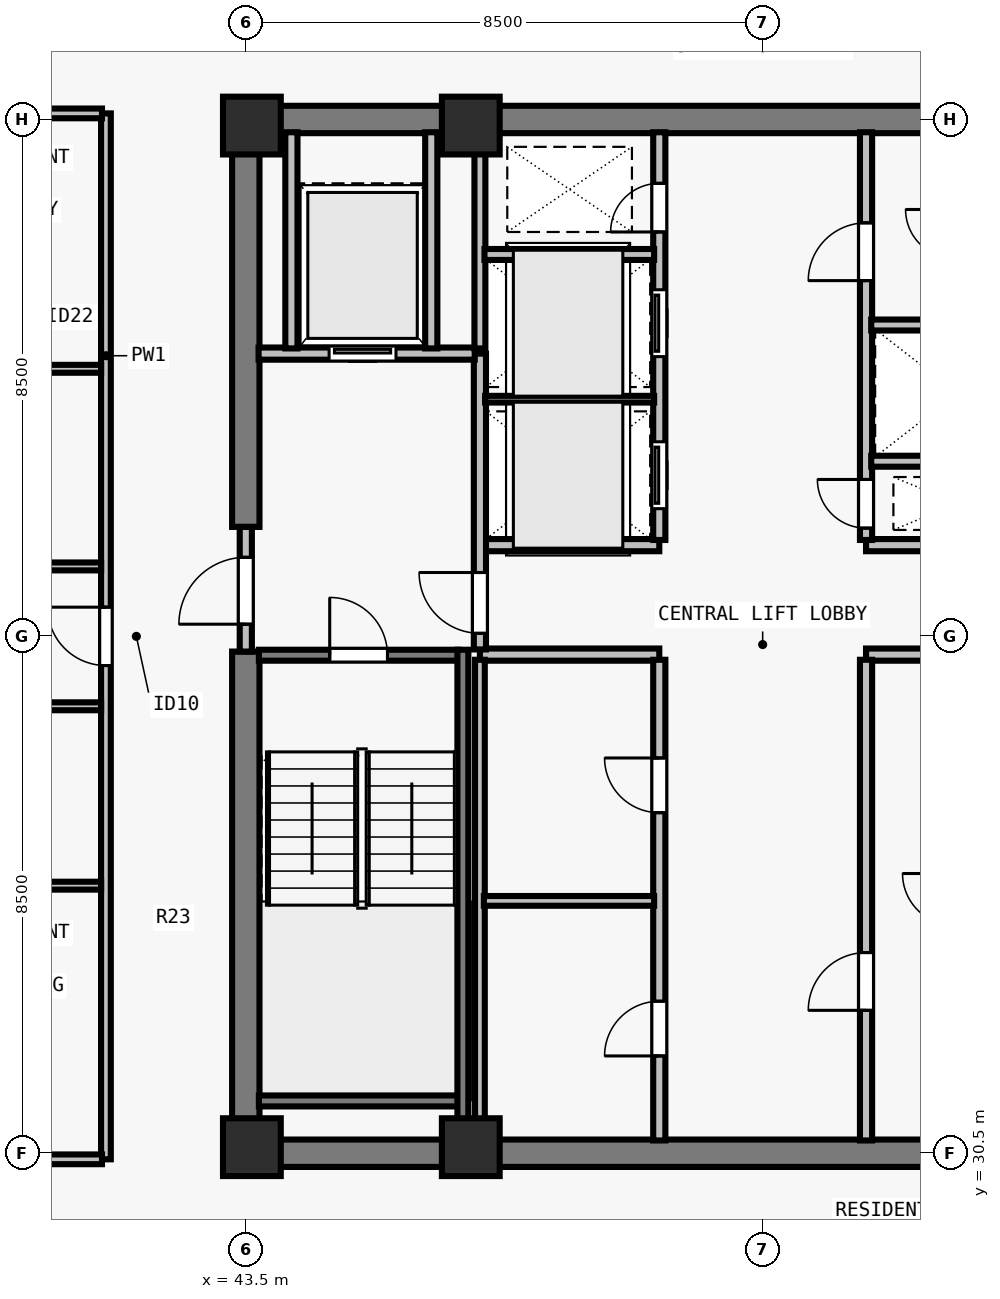
"""IFC4 building model, lengths in metres.
Left out: names, types, materials, properties, quantities, classifications, styles, units other than length and angle.
Written with IfcOpenShell. Run it as: python <this file> out.ifc"""

import sys

from ifc_helpers import new_model, si_unit, direction, frame, frame_2d, origin, origin_2d, place, context, subcontext, project, spatial, rectangle, extrude, element, fill, save


model = new_model("IFC4")
c1 = context("Model", 3, precision=1e-05, world=origin(), true_north=direction((0.0, 1.0)))
c2 = subcontext(c1, "Body", "Model", "MODEL_VIEW")
j1 = project(units=[si_unit("LENGTHUNIT", "METRE"), si_unit("PLANEANGLEUNIT", "RADIAN")], contexts=[c1])
p1 = place(None, origin())
s1 = spatial("IfcSite", under=j1, at=p1, CompositionType="ELEMENT")
p2 = place(p1, origin())
s2 = spatial("IfcBuilding", under=s1, at=p2, CompositionType="ELEMENT")
p3 = place(p2, frame((0.0, 0.0, 258.5)))
s3 = spatial("IfcBuildingStorey", under=s2, at=p3, CompositionType="ELEMENT", Elevation=258.5)
for number, where, z_axis, x_axis in (
    (1, (43.6, 30.6, 0.0), (0.0, 0.0, 1.0), (1.0, 0.0, 0.0)),
    (2, (47.2, 30.6, 0.0), (0.0, 0.0, 1.0), (1.0, 0.0, 0.0)),
    (3, (43.6, 47.4, 0.0), (0.0, 0.0, 1.0), (1.0, 0.0, 0.0)),
    (4, (47.2, 47.4, 0.0), (0.0, 0.0, 1.0), (1.0, 0.0, 0.0)),
):
    element("IfcColumn", number, at=place(p3, frame(where, z_axis=z_axis, x_axis=x_axis)), inside=s3, PredefinedType="COLUMN", context=c2, shape_type="SweptSolid", body=[
        extrude(rectangle(XDim=0.95, YDim=0.95, at=origin_2d()), origin(), (0.0, 0.0, 1.0), 3.5),
    ])
for number, where, z_axis, x_axis in (
    (5, (43.275, 30.5, 0.0), (0.0, 0.0, 1.0), (1.0, 0.0, 0.0)),
    (6, (43.275, 47.5, 0.0), (0.0, 0.0, 1.0), (1.0, 0.0, 0.0)),
):
    element("IfcWall", number, at=place(p3, frame(where, z_axis=z_axis, x_axis=x_axis)), inside=s3, PredefinedType="SHEAR", context=c2, shape_type="SweptSolid", body=[
        extrude(rectangle(XDim=17.45, YDim=0.45, at=frame_2d((8.725, 0.0))), origin(), (0.0, 0.0, 1.0), 3.29),
    ])
p4 = place(p3, frame((43.5, 30.715, 0.0), z_axis=(0.0, 0.0, 1.0), x_axis=(0.0, 1.0, 0.0)))
e7 = element("IfcWall", 7, at=p4, inside=s3, PredefinedType="SHEAR", context=c2, shape_type="SweptSolid", body=[
    extrude(rectangle(XDim=8.035, YDim=0.45, at=frame_2d((4.018, 0.0))), origin(), (0.0, 0.0, 1.0), 3.29),
])
p5 = place(p3, frame((43.5, 40.8, 0.0), z_axis=(0.0, 0.0, 1.0), x_axis=(0.0, 1.0, 0.0)))
e8 = element("IfcWall", 8, at=p5, inside=s3, PredefinedType="SHEAR", context=c2, shape_type="SweptSolid", body=[
    extrude(rectangle(XDim=6.485, YDim=0.45, at=frame_2d((3.242, 0.0))), origin(), (0.0, 0.0, 1.0), 3.29),
])
for number, where, z_axis, x_axis in (
    (9, (47.35, 38.7, 0.0), (0.0, 0.0, 1.0), (1.0, 0.0, 0.0)),
    (10, (47.35, 40.5, 0.0), (0.0, 0.0, 1.0), (1.0, 0.0, 0.0)),
    (11, (53.7, 38.7, 0.0), (0.0, 0.0, 1.0), (1.0, 0.0, 0.0)),
    (12, (53.7, 40.5, 0.0), (0.0, 0.0, 1.0), (1.0, 0.0, 0.0)),
):
    element("IfcWall", number, at=place(p3, frame(where, z_axis=z_axis, x_axis=x_axis)), inside=s3, PredefinedType="SOLIDWALL", context=c2, shape_type="SweptSolid", body=[
        extrude(rectangle(XDim=2.95, YDim=0.2, at=frame_2d((1.475, 0.0))), origin(), (0.0, 0.0, 1.0), 3.29),
    ])
p6 = place(p3, frame((50.3, 30.71, 0.0), z_axis=(0.0, 0.0, 1.0), x_axis=(0.0, 1.0, 0.0)))
e13 = element("IfcWall", 13, at=p6, inside=s3, PredefinedType="SOLIDWALL", context=c2, shape_type="SweptSolid", body=[
    extrude(rectangle(XDim=7.905, YDim=0.2, at=frame_2d((3.953, 0.0))), origin(), (0.0, 0.0, 1.0), 3.29),
])
p7 = place(p6, frame((1.39, 0.0, 0.0)))
e14 = element("IfcOpeningElement", 14, at=p7, cuts=e13, PredefinedType="OPENING", context=c2, shape_type="SweptSolid", body=[
    extrude(rectangle(XDim=0.9, YDim=2.12, at=frame_2d((0.45, 1.06))), frame((0.0, 0.11, 0.0), z_axis=(0.0, -1.0, 0.0), x_axis=(1.0, 0.0, 0.0)), (0.0, 0.0, 1.0), 0.22),
])
p8 = place(p6, frame((5.39, 0.0, 0.0)))
e15 = element("IfcOpeningElement", 15, at=p8, cuts=e13, PredefinedType="OPENING", context=c2, shape_type="SweptSolid", body=[
    extrude(rectangle(XDim=0.9, YDim=2.12, at=frame_2d((0.45, 1.06))), frame((0.0, 0.11, 0.0), z_axis=(0.0, -1.0, 0.0), x_axis=(1.0, 0.0, 0.0)), (0.0, 0.0, 1.0), 0.22),
])
p9 = place(p3, frame((53.7, 30.71, 0.0), z_axis=(0.0, 0.0, 1.0), x_axis=(0.0, 1.0, 0.0)))
e16 = element("IfcWall", 16, at=p9, inside=s3, PredefinedType="SOLIDWALL", context=c2, shape_type="SweptSolid", body=[
    extrude(rectangle(XDim=7.905, YDim=0.2, at=frame_2d((3.953, 0.0))), origin(), (0.0, 0.0, 1.0), 3.29),
])
p10 = place(p9, frame((2.14, 0.0, 0.0)))
e17 = element("IfcOpeningElement", 17, at=p10, cuts=e16, PredefinedType="OPENING", context=c2, shape_type="SweptSolid", body=[
    extrude(rectangle(XDim=0.95, YDim=2.12, at=frame_2d((0.475, 1.06))), frame((0.0, 0.11, 0.0), z_axis=(0.0, -1.0, 0.0), x_axis=(1.0, 0.0, 0.0)), (0.0, 0.0, 1.0), 0.22),
])
p11 = place(p3, frame((50.3, 40.585, 0.0), z_axis=(0.0, 0.0, 1.0), x_axis=(0.0, 1.0, 0.0)))
e18 = element("IfcWall", 18, at=p11, inside=s3, PredefinedType="SOLIDWALL", context=c2, shape_type="SweptSolid", body=[
    extrude(rectangle(XDim=6.705, YDim=0.2, at=frame_2d((3.353, 0.0))), origin(), (0.0, 0.0, 1.0), 3.29),
])
p12 = place(p11, frame((0.515, 0.0, 0.0)))
e19 = element("IfcOpeningElement", 19, at=p12, cuts=e18, PredefinedType="OPENING", context=c2, shape_type="SweptSolid", body=[
    extrude(rectangle(XDim=1.1, YDim=2.2, at=frame_2d((0.55, 1.1))), frame((0.0, 0.11, 0.0), z_axis=(0.0, -1.0, 0.0), x_axis=(1.0, 0.0, 0.0)), (0.0, 0.0, 1.0), 0.22),
])
p13 = place(p11, frame((3.015, 0.0, 0.0)))
e20 = element("IfcOpeningElement", 20, at=p13, cuts=e18, PredefinedType="OPENING", context=c2, shape_type="SweptSolid", body=[
    extrude(rectangle(XDim=1.1, YDim=2.2, at=frame_2d((0.55, 1.1))), frame((0.0, 0.11, 0.0), z_axis=(0.0, -1.0, 0.0), x_axis=(1.0, 0.0, 0.0)), (0.0, 0.0, 1.0), 0.22),
])
p14 = place(p11, frame((5.065, 0.0, 0.0)))
e21 = element("IfcOpeningElement", 21, at=p14, cuts=e18, PredefinedType="OPENING", context=c2, shape_type="SweptSolid", body=[
    extrude(rectangle(XDim=0.8, YDim=2.08, at=frame_2d((0.4, 1.04))), frame((0.0, 0.11, 0.0), z_axis=(0.0, -1.0, 0.0), x_axis=(1.0, 0.0, 0.0)), (0.0, 0.0, 1.0), 0.22),
])
p15 = place(p3, frame((53.7, 40.585, 0.0), z_axis=(0.0, 0.0, 1.0), x_axis=(0.0, 1.0, 0.0)))
e22 = element("IfcWall", 22, at=p15, inside=s3, PredefinedType="SOLIDWALL", context=c2, shape_type="SweptSolid", body=[
    extrude(rectangle(XDim=6.705, YDim=0.2, at=frame_2d((3.353, 0.0))), origin(), (0.0, 0.0, 1.0), 3.29),
])
p16 = place(p15, frame((0.195, 0.0, 0.0)))
e23 = element("IfcOpeningElement", 23, at=p16, cuts=e22, PredefinedType="OPENING", context=c2, shape_type="SweptSolid", body=[
    extrude(rectangle(XDim=0.8, YDim=2.08, at=frame_2d((0.4, 1.04))), frame((0.0, 0.11, 0.0), z_axis=(0.0, -1.0, 0.0), x_axis=(1.0, 0.0, 0.0)), (0.0, 0.0, 1.0), 0.22),
])
p17 = place(p15, frame((4.265, 0.0, 0.0)))
e24 = element("IfcOpeningElement", 24, at=p17, cuts=e22, PredefinedType="OPENING", context=c2, shape_type="SweptSolid", body=[
    extrude(rectangle(XDim=0.95, YDim=2.12, at=frame_2d((0.475, 1.06))), frame((0.0, 0.11, 0.0), z_axis=(0.0, -1.0, 0.0), x_axis=(1.0, 0.0, 0.0)), (0.0, 0.0, 1.0), 0.22),
])
p18 = place(p3, frame((43.5, 38.75, 0.0), z_axis=(0.0, 0.0, 1.0), x_axis=(0.0, 1.0, 0.0)))
e25 = element("IfcWall", 25, at=p18, inside=s3, PredefinedType="SOLIDWALL", context=c2, shape_type="SweptSolid", body=[
    extrude(rectangle(XDim=2.05, YDim=0.2, at=frame_2d((1.025, 0.0))), origin(), (0.0, 0.0, 1.0), 3.29),
])
p19 = place(p18, frame((0.45, 0.0, 0.0)))
e26 = element("IfcOpeningElement", 26, at=p19, cuts=e25, PredefinedType="OPENING", context=c2, shape_type="SweptSolid", body=[
    extrude(rectangle(XDim=1.1, YDim=2.15, at=frame_2d((0.55, 1.075))), frame((0.0, 0.11, 0.0), z_axis=(0.0, -1.0, 0.0), x_axis=(1.0, 0.0, 0.0)), (0.0, 0.0, 1.0), 0.22),
])
p20 = place(p3, frame((47.35, 38.785, 0.0), z_axis=(0.0, 0.0, 1.0), x_axis=(0.0, 1.0, 0.0)))
e27 = element("IfcWall", 27, at=p20, inside=s3, PredefinedType="SOLIDWALL", context=c2, shape_type="SweptSolid", body=[
    extrude(rectangle(XDim=4.865, YDim=0.2, at=frame_2d((2.433, 0.0))), origin(), (0.0, 0.0, 1.0), 3.29),
])
p21 = place(p20, frame((0.265, 0.0, 0.0)))
e28 = element("IfcOpeningElement", 28, at=p21, cuts=e27, PredefinedType="OPENING", context=c2, shape_type="SweptSolid", body=[
    extrude(rectangle(XDim=1.0, YDim=2.15, at=frame_2d((0.5, 1.075))), frame((0.0, 0.11, 0.0), z_axis=(0.0, -1.0, 0.0), x_axis=(1.0, 0.0, 0.0)), (0.0, 0.0, 1.0), 0.22),
])
p22 = place(p3, frame((43.71, 43.65, 0.0), z_axis=(0.0, 0.0, 1.0), x_axis=(1.0, 0.0, 0.0)))
e29 = element("IfcWall", 29, at=p22, inside=s3, PredefinedType="SOLIDWALL", context=c2, shape_type="SweptSolid", body=[
    extrude(rectangle(XDim=3.555, YDim=0.2, at=frame_2d((1.777, 0.0))), origin(), (0.0, 0.0, 1.0), 3.29),
])
p23 = place(p22, frame((1.16, 0.0, 0.0)))
e30 = element("IfcOpeningElement", 30, at=p23, cuts=e29, PredefinedType="OPENING", context=c2, shape_type="SweptSolid", body=[
    extrude(rectangle(XDim=1.1, YDim=2.2, at=frame_2d((0.55, 1.1))), frame((0.0, 0.11, 0.0), z_axis=(0.0, -1.0, 0.0), x_axis=(1.0, 0.0, 0.0)), (0.0, 0.0, 1.0), 0.22),
])
for number, where, z_axis, x_axis in (
    (31, (46.55, 43.735, 0.0), (0.0, 0.0, 1.0), (0.0, 1.0, 0.0)),
    (32, (44.25, 43.735, 0.0), (0.0, 0.0, 1.0), (0.0, 1.0, 0.0)),
):
    element("IfcWall", number, at=place(p3, frame(where, z_axis=z_axis, x_axis=x_axis)), inside=s3, PredefinedType="SOLIDWALL", context=c2, shape_type="SweptSolid", body=[
        extrude(rectangle(XDim=3.555, YDim=0.2, at=frame_2d((1.777, 0.0))), origin(), (0.0, 0.0, 1.0), 3.29),
    ])
p24 = place(p3, frame((47.35, 30.71, 0.0), z_axis=(0.0, 0.0, 1.0), x_axis=(0.0, 1.0, 0.0)))
e33 = element("IfcWall", 33, at=p24, inside=s3, PredefinedType="PARTITIONING", context=c2, shape_type="SweptSolid", body=[
    extrude(rectangle(XDim=7.905, YDim=0.16, at=frame_2d((3.953, 0.0))), origin(), (0.0, 0.0, 1.0), 3.29),
])
p25 = place(p3, frame((47.415, 34.65, 0.0), z_axis=(0.0, 0.0, 1.0), x_axis=(1.0, 0.0, 0.0)))
e34 = element("IfcWall", 34, at=p25, inside=s3, PredefinedType="PARTITIONING", context=c2, shape_type="SweptSolid", body=[
    extrude(rectangle(XDim=2.8, YDim=0.16, at=frame_2d((1.4, 0.0))), origin(), (0.0, 0.0, 1.0), 3.29),
])
p26 = place(p3, frame((47.35, 43.735, 0.0), z_axis=(0.0, 0.0, 1.0), x_axis=(0.0, 1.0, 0.0)))
e35 = element("IfcWall", 35, at=p26, inside=s3, PredefinedType="SOLIDWALL", context=c2, shape_type="SweptSolid", body=[
    extrude(rectangle(XDim=3.555, YDim=0.18, at=frame_2d((1.777, 0.0))), origin(), (0.0, 0.0, 1.0), 3.29),
])
p27 = place(p3, frame((47.435, 42.9, 0.0), z_axis=(0.0, 0.0, 1.0), x_axis=(1.0, 0.0, 0.0)))
e36 = element("IfcWall", 36, at=p27, inside=s3, PredefinedType="PARTITIONING", context=c2, shape_type="SweptSolid", body=[
    extrude(rectangle(XDim=2.78, YDim=0.11, at=frame_2d((1.39, 0.0))), origin(), (0.0, 0.0, 1.0), 3.29),
])
p28 = place(p3, frame((47.425, 45.28, 0.0), z_axis=(0.0, 0.0, 1.0), x_axis=(1.0, 0.0, 0.0)))
e37 = element("IfcWall", 37, at=p28, inside=s3, PredefinedType="SOLIDWALL", context=c2, shape_type="SweptSolid", body=[
    extrude(rectangle(XDim=2.79, YDim=0.18, at=frame_2d((1.395, 0.0))), origin(), (0.0, 0.0, 1.0), 3.29),
])
p29 = place(p3, frame((53.785, 41.88, 0.0), z_axis=(0.0, 0.0, 1.0), x_axis=(1.0, 0.0, 0.0)))
e38 = element("IfcWall", 38, at=p29, inside=s3, PredefinedType="SOLIDWALL", context=c2, shape_type="SweptSolid", body=[
    extrude(rectangle(XDim=2.78, YDim=0.18, at=frame_2d((1.39, 0.0))), origin(), (0.0, 0.0, 1.0), 3.29),
])
p30 = place(p3, frame((53.785, 44.12, 0.0), z_axis=(0.0, 0.0, 1.0), x_axis=(1.0, 0.0, 0.0)))
e39 = element("IfcWall", 39, at=p30, inside=s3, PredefinedType="SOLIDWALL", context=c2, shape_type="SweptSolid", body=[
    extrude(rectangle(XDim=2.79, YDim=0.18, at=frame_2d((1.395, 0.0))), origin(), (0.0, 0.0, 1.0), 3.29),
])
p31 = place(p3, frame((41.2, 30.4, 0.0), z_axis=(0.0, 0.0, 1.0), x_axis=(0.0, 1.0, 0.0)))
e40 = element("IfcWall", 40, at=p31, inside=s3, PredefinedType="PARTITIONING", context=c2, shape_type="SweptSolid", body=[
    extrude(rectangle(XDim=17.2, YDim=0.16, at=frame_2d((8.6, 0.0))), origin(), (0.0, 0.0, 1.0), 3.29),
])
p32 = place(p31, frame((8.12, 0.0, 0.0)))
e41 = element("IfcOpeningElement", 41, at=p32, cuts=e40, PredefinedType="OPENING", context=c2, shape_type="SweptSolid", body=[
    extrude(rectangle(XDim=0.96, YDim=2.18, at=frame_2d((0.48, 1.09))), frame((0.0, 0.09, 0.0), z_axis=(0.0, -1.0, 0.0), x_axis=(1.0, 0.0, 0.0)), (0.0, 0.0, 1.0), 0.18),
])
for number, where, z_axis, x_axis in (
    (42, (29.805, 30.4, 0.0), (0.0, 0.0, 1.0), (1.0, 0.0, 0.0)),
    (43, (29.805, 47.6, 0.0), (0.0, 0.0, 1.0), (1.0, 0.0, 0.0)),
):
    element("IfcWall", number, at=place(p3, frame(where, z_axis=z_axis, x_axis=x_axis)), inside=s3, PredefinedType="PARTITIONING", context=c2, shape_type="SweptSolid", body=[
        extrude(rectangle(XDim=11.33, YDim=0.16, at=frame_2d((5.665, 0.0))), origin(), (0.0, 0.0, 1.0), 3.29),
    ])
p33 = place(p3, frame((38.37, 34.9, 0.0), z_axis=(0.0, 0.0, 1.0), x_axis=(1.0, 0.0, 0.0)))
e44 = element("IfcWall", 44, at=p33, inside=s3, PredefinedType="PLUMBINGWALL", context=c2, shape_type="SweptSolid", body=[
    extrude(rectangle(XDim=2.75, YDim=0.13, at=frame_2d((1.375, 0.0))), origin(), (0.0, 0.0, 1.0), 3.29),
])
p34 = place(p3, frame((38.37, 37.85, 0.0), z_axis=(0.0, 0.0, 1.0), x_axis=(1.0, 0.0, 0.0)))
e45 = element("IfcWall", 45, at=p34, inside=s3, PredefinedType="PLUMBINGWALL", context=c2, shape_type="SweptSolid", body=[
    extrude(rectangle(XDim=2.75, YDim=0.13, at=frame_2d((1.375, 0.0))), origin(), (0.0, 0.0, 1.0), 3.29),
])
p35 = place(p34, frame((0.55, 0.0, 0.0)))
e46 = element("IfcOpeningElement", 46, at=p35, cuts=e45, PredefinedType="OPENING", context=c2, shape_type="SweptSolid", body=[
    extrude(rectangle(XDim=0.85, YDim=2.08, at=frame_2d((0.425, 1.04))), frame((0.0, 0.075, 0.0), z_axis=(0.0, -1.0, 0.0), x_axis=(1.0, 0.0, 0.0)), (0.0, 0.0, 1.0), 0.15),
])
p36 = place(p3, frame((38.37, 43.4, 0.0), z_axis=(0.0, 0.0, 1.0), x_axis=(1.0, 0.0, 0.0)))
e47 = element("IfcWall", 47, at=p36, inside=s3, PredefinedType="PLUMBINGWALL", context=c2, shape_type="SweptSolid", body=[
    extrude(rectangle(XDim=2.75, YDim=0.13, at=frame_2d((1.375, 0.0))), origin(), (0.0, 0.0, 1.0), 2.958),
])
p37 = place(p3, frame((38.37, 40.15, 0.0), z_axis=(0.0, 0.0, 1.0), x_axis=(1.0, 0.0, 0.0)))
e48 = element("IfcWall", 48, at=p37, inside=s3, PredefinedType="PLUMBINGWALL", context=c2, shape_type="SweptSolid", body=[
    extrude(rectangle(XDim=2.75, YDim=0.13, at=frame_2d((1.375, 0.0))), origin(), (0.0, 0.0, 1.0), 3.29),
])
p38 = place(p37, frame((0.55, 0.0, 0.0)))
e49 = element("IfcOpeningElement", 49, at=p38, cuts=e48, PredefinedType="OPENING", context=c2, shape_type="SweptSolid", body=[
    extrude(rectangle(XDim=0.88, YDim=2.1, at=frame_2d((0.44, 1.05))), frame((0.0, 0.075, 0.0), z_axis=(0.0, -1.0, 0.0), x_axis=(1.0, 0.0, 0.0)), (0.0, 0.0, 1.0), 0.15),
])
p39 = place(p3, frame((43.715, 38.69, 0.0), z_axis=(0.0, 0.0, 1.0), x_axis=(1.0, 0.0, 0.0)))
e50 = element("IfcWall", 50, at=p39, inside=s3, PredefinedType="SOLIDWALL", context=c2, shape_type="SweptSolid", body=[
    extrude(rectangle(XDim=3.28, YDim=0.18, at=frame_2d((1.64, 0.0))), origin(), (0.0, 0.0, 1.0), 3.29),
])
p40 = place(p39, frame((1.165, 0.0, 0.0)))
e51 = element("IfcOpeningElement", 51, at=p40, cuts=e50, PredefinedType="OPENING", context=c2, shape_type="SweptSolid", body=[
    extrude(rectangle(XDim=0.95, YDim=2.15, at=frame_2d((0.475, 1.075))), frame((0.0, 0.1, 0.0), z_axis=(0.0, -1.0, 0.0), x_axis=(1.0, 0.0, 0.0)), (0.0, 0.0, 1.0), 0.2),
])
p41 = place(p3, frame((43.715, 31.36, 0.0), z_axis=(0.0, 0.0, 1.0), x_axis=(1.0, 0.0, 0.0)))
e52 = element("IfcWall", 52, at=p41, inside=s3, PredefinedType="SOLIDWALL", context=c2, shape_type="SweptSolid", body=[
    extrude(rectangle(XDim=3.28, YDim=0.18, at=frame_2d((1.64, 0.0))), origin(), (0.0, 0.0, 1.0), 3.29),
])
p42 = place(p3, frame((47.07, 38.78, 0.0), z_axis=(0.0, 0.0, 1.0), x_axis=(0.0, -1.0, 0.0)))
e53 = element("IfcWall", 53, at=p42, inside=s3, PredefinedType="SOLIDWALL", context=c2, shape_type="SweptSolid", body=[
    extrude(rectangle(XDim=8.067, YDim=0.18, at=frame_2d((4.034, 0.0))), origin(), (0.0, 0.0, 1.0), 3.29),
])
p43 = place(p19, origin())
e54 = element("IfcDoor", 54, at=p43, inside=s3, OperationType="SINGLE_SWING_LEFT", PredefinedType="DOOR", context=c2, shape_type="SweptSolid", body=[
    extrude(rectangle(XDim=1.1, YDim=2.15, at=frame_2d((0.55, 1.075))), frame((0.0, 0.025, 0.0), z_axis=(0.0, -1.0, 0.0), x_axis=(1.0, 0.0, 0.0)), (0.0, 0.0, 1.0), 0.05),
])
fill(e26, e54)
p44 = place(p21, origin())
e55 = element("IfcDoor", 55, at=p44, inside=s3, OperationType="SINGLE_SWING_RIGHT", PredefinedType="DOOR", context=c2, shape_type="SweptSolid", body=[
    extrude(rectangle(XDim=1.0, YDim=2.15, at=frame_2d((0.5, 1.075))), frame((0.0, 0.025, 0.0), z_axis=(0.0, -1.0, 0.0), x_axis=(1.0, 0.0, 0.0)), (0.0, 0.0, 1.0), 0.05),
])
fill(e28, e55)
p45 = place(p23, origin())
e56 = element("IfcDoor", 56, at=p45, inside=s3, OperationType="SLIDING_TO_LEFT", PredefinedType="DOOR", context=c2, shape_type="SweptSolid", body=[
    extrude(rectangle(XDim=1.1, YDim=2.2, at=frame_2d((0.55, 1.1))), frame((0.0, 0.025, 0.0), z_axis=(0.0, -1.0, 0.0), x_axis=(1.0, 0.0, 0.0)), (0.0, 0.0, 1.0), 0.05),
])
fill(e30, e56)
p46 = place(p7, origin())
e57 = element("IfcDoor", 57, at=p46, inside=s3, OperationType="SINGLE_SWING_LEFT", PredefinedType="DOOR", context=c2, shape_type="SweptSolid", body=[
    extrude(rectangle(XDim=0.9, YDim=2.12, at=frame_2d((0.45, 1.06))), frame((0.0, 0.025, 0.0), z_axis=(0.0, -1.0, 0.0), x_axis=(1.0, 0.0, 0.0)), (0.0, 0.0, 1.0), 0.05),
])
fill(e14, e57)
p47 = place(p8, origin())
e58 = element("IfcDoor", 58, at=p47, inside=s3, OperationType="SINGLE_SWING_RIGHT", PredefinedType="DOOR", context=c2, shape_type="SweptSolid", body=[
    extrude(rectangle(XDim=0.9, YDim=2.12, at=frame_2d((0.45, 1.06))), frame((0.0, 0.025, 0.0), z_axis=(0.0, -1.0, 0.0), x_axis=(1.0, 0.0, 0.0)), (0.0, 0.0, 1.0), 0.05),
])
fill(e15, e58)
p48 = place(p10, origin())
e59 = element("IfcDoor", 59, at=p48, inside=s3, OperationType="SINGLE_SWING_LEFT", PredefinedType="DOOR", context=c2, shape_type="SweptSolid", body=[
    extrude(rectangle(XDim=0.95, YDim=2.12, at=frame_2d((0.475, 1.06))), frame((0.0, 0.025, 0.0), z_axis=(0.0, -1.0, 0.0), x_axis=(1.0, 0.0, 0.0)), (0.0, 0.0, 1.0), 0.05),
])
fill(e17, e59)
p49 = place(p12, origin())
e60 = element("IfcDoor", 60, at=p49, inside=s3, OperationType="SLIDING_TO_LEFT", PredefinedType="DOOR", context=c2, shape_type="SweptSolid", body=[
    extrude(rectangle(XDim=1.1, YDim=2.2, at=frame_2d((0.55, 1.1))), frame((0.0, 0.025, 0.0), z_axis=(0.0, -1.0, 0.0), x_axis=(1.0, 0.0, 0.0)), (0.0, 0.0, 1.0), 0.05),
])
fill(e19, e60)
p50 = place(p13, origin())
e61 = element("IfcDoor", 61, at=p50, inside=s3, OperationType="SLIDING_TO_LEFT", PredefinedType="DOOR", context=c2, shape_type="SweptSolid", body=[
    extrude(rectangle(XDim=1.1, YDim=2.2, at=frame_2d((0.55, 1.1))), frame((0.0, 0.025, 0.0), z_axis=(0.0, -1.0, 0.0), x_axis=(1.0, 0.0, 0.0)), (0.0, 0.0, 1.0), 0.05),
])
fill(e20, e61)
p51 = place(p14, origin())
e62 = element("IfcDoor", 62, at=p51, inside=s3, OperationType="SINGLE_SWING_LEFT", PredefinedType="DOOR", context=c2, shape_type="SweptSolid", body=[
    extrude(rectangle(XDim=0.8, YDim=2.08, at=frame_2d((0.4, 1.04))), frame((0.0, 0.025, 0.0), z_axis=(0.0, -1.0, 0.0), x_axis=(1.0, 0.0, 0.0)), (0.0, 0.0, 1.0), 0.05),
])
fill(e21, e62)
p52 = place(p16, origin())
e63 = element("IfcDoor", 63, at=p52, inside=s3, OperationType="SINGLE_SWING_RIGHT", PredefinedType="DOOR", context=c2, shape_type="SweptSolid", body=[
    extrude(rectangle(XDim=0.8, YDim=2.08, at=frame_2d((0.4, 1.04))), frame((0.0, 0.025, 0.0), z_axis=(0.0, -1.0, 0.0), x_axis=(1.0, 0.0, 0.0)), (0.0, 0.0, 1.0), 0.05),
])
fill(e23, e63)
p53 = place(p17, origin())
e64 = element("IfcDoor", 64, at=p53, inside=s3, OperationType="SINGLE_SWING_LEFT", PredefinedType="DOOR", context=c2, shape_type="SweptSolid", body=[
    extrude(rectangle(XDim=0.95, YDim=2.12, at=frame_2d((0.475, 1.06))), frame((0.0, 0.025, 0.0), z_axis=(0.0, -1.0, 0.0), x_axis=(1.0, 0.0, 0.0)), (0.0, 0.0, 1.0), 0.05),
])
fill(e24, e64)
p54 = place(p32, origin())
e65 = element("IfcDoor", 65, at=p54, inside=s3, OperationType="SINGLE_SWING_RIGHT", PredefinedType="DOOR", context=c2, shape_type="SweptSolid", body=[
    extrude(rectangle(XDim=0.96, YDim=2.18, at=frame_2d((0.48, 1.09))), frame((0.0, 0.025, 0.0), z_axis=(0.0, -1.0, 0.0), x_axis=(1.0, 0.0, 0.0)), (0.0, 0.0, 1.0), 0.05),
])
fill(e41, e65)
p55 = place(p40, origin())
e66 = element("IfcDoor", 66, at=p55, inside=s3, OperationType="SINGLE_SWING_LEFT", PredefinedType="DOOR", context=c2, shape_type="SweptSolid", body=[
    extrude(rectangle(XDim=0.95, YDim=2.15, at=frame_2d((0.475, 1.075))), frame((0.0, 0.025, 0.0), z_axis=(0.0, -1.0, 0.0), x_axis=(1.0, 0.0, 0.0)), (0.0, 0.0, 1.0), 0.05),
])
fill(e51, e66)
save(model, sys.argv[1])
